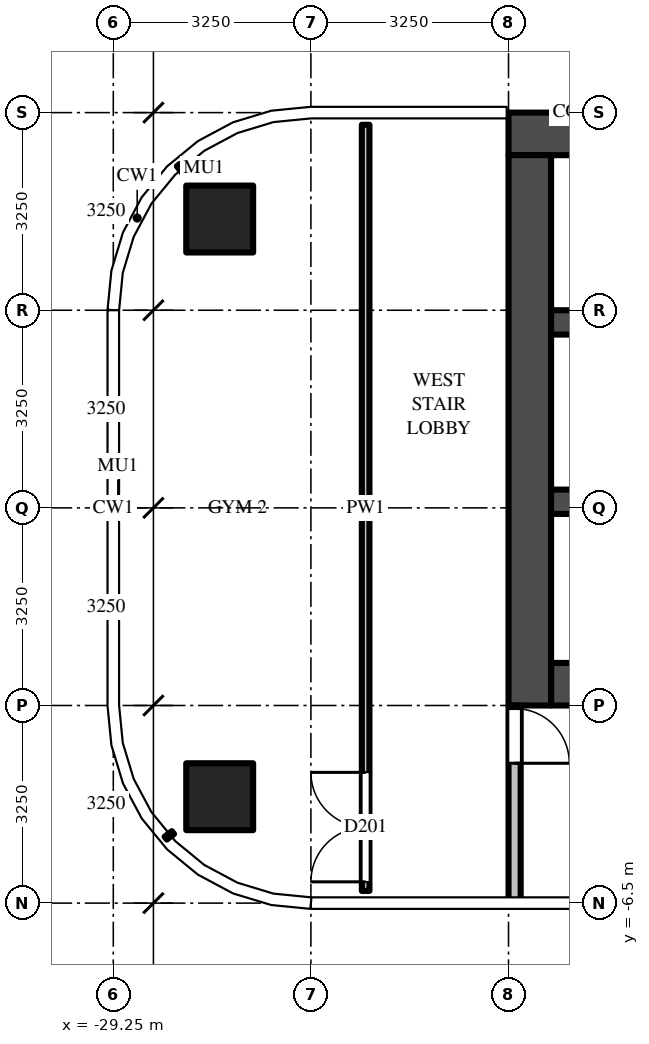
"""IFC4 building model, lengths in metres.
Left out: names, types, materials, properties, quantities, classifications, styles, units other than length and angle.
Written with IfcOpenShell. Run it as: python <this file> out.ifc"""

import sys

from ifc_helpers import new_model, si_unit, direction, frame, frame_2d, origin, origin_2d, place, context, subcontext, project, spatial, rectangle, extrude, source, transform, mapped, element, fill, save


model = new_model("IFC4")
c1 = context("Model", 3, precision=1e-05, world=origin(), true_north=direction((0.0, 1.0)))
c2 = subcontext(c1, "Body", "Model", "MODEL_VIEW")
j1 = project(units=[si_unit("LENGTHUNIT", "METRE"), si_unit("PLANEANGLEUNIT", "RADIAN")], contexts=[c1])
p1 = place(None, origin())
s1 = spatial("IfcSite", under=j1, at=p1, CompositionType="ELEMENT")
p2 = place(p1, origin())
s2 = spatial("IfcBuilding", under=s1, at=p2, CompositionType="ELEMENT")
p3 = place(p2, frame((0.0, 0.0, 224.6)))
s3 = spatial("IfcBuildingStorey", under=s2, at=p3, CompositionType="ELEMENT", Elevation=224.6)
m1 = source(origin(), c2, "Body", "SweptSolid", [
    extrude(rectangle(XDim=1.1, YDim=1.1, at=origin_2d()), origin(), (0.0, 0.0, 1.0), 3.9),
])
for number, where, z_axis, x_axis in (
    (1, (-27.5, -4.75, 0.0), (0.0, 0.0, 1.0), (1.0, 0.0, 0.0)),
    (2, (-27.5, 4.75, 0.0), (0.0, 0.0, 1.0), (1.0, 0.0, 0.0)),
):
    element("IfcColumn", number, at=place(p3, frame(where, z_axis=z_axis, x_axis=x_axis)), inside=s3, PredefinedType="COLUMN", context=c2, shape_type="MappedRepresentation", body=[
        mapped(m1, transform((0.0, 0.0, 0.0))),
    ])
m2 = source(origin(), c2, "Body", "SweptSolid", [
    extrude(rectangle(XDim=16.6, YDim=0.7, at=frame_2d((8.3, 0.0))), origin(), (0.0, 0.0, 1.0), 3.7),
])
p4 = place(p3, frame((-6.15, 6.15, 0.0), z_axis=(0.0, 0.0, 1.0), x_axis=(-1.0, 0.0, 0.0)))
e3 = element("IfcWall", 3, at=p4, inside=s3, PredefinedType="SHEAR", context=c2, shape_type="MappedRepresentation", body=[
    mapped(m2, transform((0.0, 0.0, 0.0))),
])
m3 = source(origin(), c2, "Body", "SweptSolid", [
    extrude(rectangle(XDim=14.85, YDim=0.7, at=frame_2d((7.425, 0.0))), origin(), (0.0, 0.0, 1.0), 3.7),
])
p5 = place(p3, frame((-7.2, -2.9, 0.0), z_axis=(0.0, 0.0, 1.0), x_axis=(-1.0, 0.0, 0.0)))
e4 = element("IfcWall", 4, at=p5, inside=s3, PredefinedType="SHEAR", context=c2, shape_type="MappedRepresentation", body=[
    mapped(m3, transform((0.0, 0.0, 0.0))),
])
m4 = source(origin(), c2, "Body", "SweptSolid", [
    extrude(rectangle(XDim=1.1, YDim=2.1, at=frame_2d((0.55, 1.05))), frame((0.0, 0.36, 0.0), z_axis=(0.0, -1.0, 0.0), x_axis=(1.0, 0.0, 0.0)), (0.0, 0.0, 1.0), 0.72),
])
p6 = place(p5, frame((0.55, 0.0, 0.0)))
e5 = element("IfcOpeningElement", 5, at=p6, cuts=e4, PredefinedType="OPENING", context=c2, shape_type="MappedRepresentation", body=[
    mapped(m4, transform((0.0, 0.0, 0.0))),
])
p7 = place(p5, frame((3.15, 0.0, 0.0)))
e6 = element("IfcOpeningElement", 6, at=p7, cuts=e4, PredefinedType="OPENING", context=c2, shape_type="MappedRepresentation", body=[
    mapped(m4, transform((0.0, 0.0, 0.0))),
])
m5 = source(origin(), c2, "Body", "SweptSolid", [
    extrude(rectangle(XDim=1.2, YDim=2.1, at=frame_2d((0.6, 1.05))), frame((0.0, 0.36, 0.0), z_axis=(0.0, -1.0, 0.0), x_axis=(1.0, 0.0, 0.0)), (0.0, 0.0, 1.0), 0.72),
])
p8 = place(p5, frame((5.7, 0.0, 0.0)))
e7 = element("IfcOpeningElement", 7, at=p8, cuts=e4, PredefinedType="OPENING", context=c2, shape_type="MappedRepresentation", body=[
    mapped(m5, transform((0.0, 0.0, 0.0))),
])
m6 = source(origin(), c2, "Body", "SweptSolid", [
    extrude(rectangle(XDim=1.3, YDim=2.1, at=frame_2d((0.65, 1.05))), frame((0.0, 0.36, 0.0), z_axis=(0.0, -1.0, 0.0), x_axis=(1.0, 0.0, 0.0)), (0.0, 0.0, 1.0), 0.72),
])
p9 = place(p5, frame((12.2, 0.0, 0.0)))
e8 = element("IfcOpeningElement", 8, at=p9, cuts=e4, PredefinedType="OPENING", context=c2, shape_type="MappedRepresentation", body=[
    mapped(m6, transform((0.0, 0.0, 0.0))),
])
p10 = place(p5, frame((9.85, 0.0, 0.0)))
e9 = element("IfcOpeningElement", 9, at=p10, cuts=e4, PredefinedType="OPENING", context=c2, shape_type="MappedRepresentation", body=[
    mapped(m5, transform((0.0, 0.0, 0.0))),
])
m7 = source(origin(), c2, "Body", "SweptSolid", [
    extrude(rectangle(XDim=1.0, YDim=2.1, at=frame_2d((0.5, 1.05))), frame((0.0, 0.36, 0.0), z_axis=(0.0, -1.0, 0.0), x_axis=(1.0, 0.0, 0.0)), (0.0, 0.0, 1.0), 0.72),
])
p11 = place(p5, frame((7.9, 0.0, 0.0)))
e10 = element("IfcOpeningElement", 10, at=p11, cuts=e4, PredefinedType="OPENING", context=c2, shape_type="MappedRepresentation", body=[
    mapped(m7, transform((0.0, 0.0, 0.0))),
])
m8 = source(origin(), c2, "Body", "SweptSolid", [
    extrude(rectangle(XDim=9.05, YDim=0.7, at=frame_2d((4.525, 0.0))), origin(), (0.0, 0.0, 1.0), 3.7),
])
p12 = place(p3, frame((-22.4, 5.8, 0.0), z_axis=(0.0, 0.0, 1.0), x_axis=(0.0, -1.0, 0.0)))
e11 = element("IfcWall", 11, at=p12, inside=s3, PredefinedType="SHEAR", context=c2, shape_type="MappedRepresentation", body=[
    mapped(m8, transform((0.0, 0.0, 0.0))),
])
m9 = source(origin(), c2, "Body", "SweptSolid", [
    extrude(rectangle(XDim=14.85, YDim=0.4, at=frame_2d((7.425, 0.0))), origin(), (0.0, 0.0, 1.0), 3.7),
])
p13 = place(p3, frame((-7.2, 0.1, 0.0), z_axis=(0.0, 0.0, 1.0), x_axis=(-1.0, 0.0, 0.0)))
e12 = element("IfcWall", 12, at=p13, inside=s3, PredefinedType="SHEAR", context=c2, shape_type="MappedRepresentation", body=[
    mapped(m9, transform((0.0, 0.0, 0.0))),
])
m10 = source(origin(), c2, "Body", "SweptSolid", [
    extrude(rectangle(XDim=1.0, YDim=2.1, at=frame_2d((0.5, 1.05))), frame((0.0, 0.21, 0.0), z_axis=(0.0, -1.0, 0.0), x_axis=(1.0, 0.0, 0.0)), (0.0, 0.0, 1.0), 0.42),
])
p14 = place(p13, frame((7.9, 0.0, 0.0)))
e13 = element("IfcOpeningElement", 13, at=p14, cuts=e12, PredefinedType="OPENING", context=c2, shape_type="MappedRepresentation", body=[
    mapped(m10, transform((0.0, 0.0, 0.0))),
])
m11 = source(origin(), c2, "Body", "SweptSolid", [
    extrude(rectangle(XDim=5.7, YDim=0.4, at=frame_2d((2.85, 0.0))), origin(), (0.0, 0.0, 1.0), 3.7),
])
p15 = place(p3, frame((-16.35, 3.05, 0.0), z_axis=(0.0, 0.0, 1.0), x_axis=(-1.0, 0.0, 0.0)))
e14 = element("IfcWall", 14, at=p15, inside=s3, PredefinedType="SHEAR", context=c2, shape_type="MappedRepresentation", body=[
    mapped(m11, transform((0.0, 0.0, 0.0))),
])
m12 = source(origin(), c2, "Body", "SweptSolid", [
    extrude(rectangle(XDim=3.25, YDim=0.2, at=frame_2d((1.625, 0.0))), origin(), (0.0, 0.0, 1.0), 3.7),
])
p16 = place(p3, frame((-22.65, -3.25, 0.0), z_axis=(0.0, 0.0, 1.0), x_axis=(0.0, -1.0, 0.0)))
e15 = element("IfcWall", 15, at=p16, inside=s3, PredefinedType="PARTITIONING", context=c2, shape_type="MappedRepresentation", body=[
    mapped(m12, transform((0.0, 0.0, 0.0))),
])
m13 = source(origin(), c2, "Body", "SweptSolid", [
    extrude(rectangle(XDim=0.9, YDim=2.1, at=frame_2d((0.45, 1.05))), frame((0.0, 0.11, 0.0), z_axis=(0.0, -1.0, 0.0), x_axis=(1.0, 0.0, 0.0)), (0.0, 0.0, 1.0), 0.22),
])
p17 = place(p16, frame((0.05, 0.0, 0.0)))
e16 = element("IfcOpeningElement", 16, at=p17, cuts=e15, PredefinedType="OPENING", context=c2, shape_type="MappedRepresentation", body=[
    mapped(m13, transform((0.0, 0.0, 0.0))),
])
m14 = source(origin(), c2, "Body", "SweptSolid", [
    extrude(rectangle(XDim=12.6, YDim=0.125, at=frame_2d((6.3, 0.0))), origin(), (0.0, 0.0, 1.0), 2.78),
])
p18 = place(p3, frame((-25.1, -6.3, 0.0), z_axis=(0.0, 0.0, 1.0), x_axis=(0.0, 1.0, 0.0)))
e17 = element("IfcWall", 17, at=p18, inside=s3, PredefinedType="PARTITIONING", context=c2, shape_type="MappedRepresentation", body=[
    mapped(m14, transform((0.0, 0.0, 0.0))),
])
m15 = source(origin(), c2, "Body", "SweptSolid", [
    extrude(rectangle(XDim=1.8, YDim=2.1, at=frame_2d((0.9, 1.05))), frame((0.0, 0.073, 0.0), z_axis=(0.0, -1.0, 0.0), x_axis=(1.0, 0.0, 0.0)), (0.0, 0.0, 1.0), 0.145),
])
p19 = place(p18, frame((0.15, 0.0, 0.0)))
e18 = element("IfcOpeningElement", 18, at=p19, cuts=e17, PredefinedType="OPENING", context=c2, shape_type="MappedRepresentation", body=[
    mapped(m15, transform((0.0, 0.0, 0.0))),
])
m16 = source(origin(), c2, "Body", "SweptSolid", [
    extrude(rectangle(XDim=0.9, YDim=2.1, at=frame_2d((0.45, 1.05))), frame((0.0, 0.025, 0.0), z_axis=(0.0, -1.0, 0.0), x_axis=(1.0, 0.0, 0.0)), (0.0, 0.0, 1.0), 0.05),
])
p20 = place(p17, origin())
e19 = element("IfcDoor", 19, at=p20, inside=s3, OperationType="SINGLE_SWING_RIGHT", PredefinedType="DOOR", context=c2, shape_type="MappedRepresentation", body=[
    mapped(m16, transform((0.0, 0.0, 0.0))),
])
fill(e16, e19)
m17 = source(origin(), c2, "Body", "SweptSolid", [
    extrude(rectangle(XDim=1.8, YDim=2.1, at=frame_2d((0.9, 1.05))), frame((0.0, 0.025, 0.0), z_axis=(0.0, -1.0, 0.0), x_axis=(1.0, 0.0, 0.0)), (0.0, 0.0, 1.0), 0.05),
])
p21 = place(p19, origin())
e20 = element("IfcDoor", 20, at=p21, inside=s3, OperationType="DOUBLE_DOOR_SINGLE_SWING", PredefinedType="DOOR", context=c2, shape_type="MappedRepresentation", body=[
    mapped(m17, transform((0.0, 0.0, 0.0))),
])
fill(e18, e20)
save(model, sys.argv[1])
